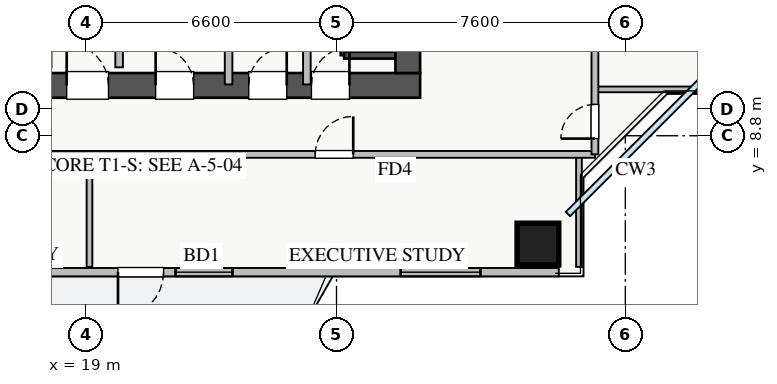
"""IFC4 building model, lengths in metres.
Left out: names, types, materials, properties, quantities, classifications, styles, units other than length and angle.
Written with IfcOpenShell. Run it as: python <this file> out.ifc"""

import sys

from ifc_helpers import new_model, si_unit, direction, frame, frame_2d, origin, origin_2d, place, context, subcontext, project, spatial, rectangle, extrude, source, transform, mapped, element, fill, save


model = new_model("IFC4")
c1 = context("Model", 3, precision=1e-05, world=origin(), true_north=direction((0.0, 1.0)))
c2 = subcontext(c1, "Body", "Model", "MODEL_VIEW")
j1 = project(units=[si_unit("LENGTHUNIT", "METRE"), si_unit("PLANEANGLEUNIT", "RADIAN")], contexts=[c1])
p1 = place(None, origin())
s1 = spatial("IfcSite", under=j1, at=p1, CompositionType="ELEMENT")
p2 = place(p1, origin())
s2 = spatial("IfcBuilding", under=s1, at=p2, CompositionType="ELEMENT")
p3 = place(p2, frame((0.0, 0.0, 100.25)))
s3 = spatial("IfcBuildingStorey", under=s2, at=p3, CompositionType="ELEMENT", Elevation=100.25)
p4 = place(p3, frame((25.8, 10.92, 0.0), z_axis=(0.0, 0.0, 1.0), x_axis=(0.0, 1.0, 0.0)))
e1 = element("IfcWall", 1, at=p4, inside=s3, PredefinedType="SHEAR", context=c2, shape_type="SweptSolid", body=[
    extrude(rectangle(XDim=1.06, YDim=0.18, at=frame_2d((0.53, 0.0))), origin(), (0.0, 0.0, 1.0), 3.07),
])
p5 = place(p3, frame((25.8, 10.92, 0.0), z_axis=(0.0, 0.0, 1.0), x_axis=(1.0, 0.0, 0.0)))
e2 = element("IfcWall", 2, at=p5, inside=s3, PredefinedType="SHEAR", context=c2, shape_type="SweptSolid", body=[
    extrude(rectangle(XDim=1.35, YDim=0.18, at=frame_2d((0.675, 0.0))), origin(), (0.0, 0.0, 1.0), 3.07),
])
p6 = place(p3, frame((10.2, 10.125, 0.0), z_axis=(0.0, 0.0, 1.0), x_axis=(1.0, 0.0, 0.0)))
e3 = element("IfcWall", 3, at=p6, inside=s3, PredefinedType="SHEAR", context=c2, shape_type="SweptSolid", body=[
    extrude(rectangle(XDim=17.6, YDim=0.65, at=frame_2d((8.8, 0.0))), origin(), (0.0, 0.0, 1.0), 3.25),
])
p7 = place(p6, frame((1.15, 0.0, 0.0)))
e4 = element("IfcOpeningElement", 4, at=p7, cuts=e3, PredefinedType="OPENING", context=c2, shape_type="SweptSolid", body=[
    extrude(rectangle(XDim=1.1, YDim=2.05, at=frame_2d((0.55, 1.025))), frame((0.0, 0.335, 0.0), z_axis=(0.0, -1.0, 0.0), x_axis=(1.0, 0.0, 0.0)), (0.0, 0.0, 1.0), 0.67),
])
p8 = place(p6, frame((8.3, 0.0, 0.0)))
e5 = element("IfcOpeningElement", 5, at=p8, cuts=e3, PredefinedType="OPENING", context=c2, shape_type="SweptSolid", body=[
    extrude(rectangle(XDim=1.1, YDim=2.05, at=frame_2d((0.55, 1.025))), frame((0.0, 0.335, 0.0), z_axis=(0.0, -1.0, 0.0), x_axis=(1.0, 0.0, 0.0)), (0.0, 0.0, 1.0), 0.67),
])
p9 = place(p6, frame((4.9, 0.0, 0.0)))
e6 = element("IfcOpeningElement", 6, at=p9, cuts=e3, PredefinedType="OPENING", context=c2, shape_type="SweptSolid", body=[
    extrude(rectangle(XDim=1.1, YDim=2.05, at=frame_2d((0.55, 1.025))), frame((0.0, 0.335, 0.0), z_axis=(0.0, -1.0, 0.0), x_axis=(1.0, 0.0, 0.0)), (0.0, 0.0, 1.0), 0.67),
])
p10 = place(p6, frame((14.74, 0.0, 0.0)))
e7 = element("IfcOpeningElement", 7, at=p10, cuts=e3, PredefinedType="OPENING", context=c2, shape_type="SweptSolid", body=[
    extrude(rectangle(XDim=1.0, YDim=2.05, at=frame_2d((0.5, 1.025))), frame((0.0, 0.335, 0.0), z_axis=(0.0, -1.0, 0.0), x_axis=(1.0, 0.0, 0.0)), (0.0, 0.0, 1.0), 0.67),
])
p11 = place(p6, frame((10.64, 0.0, 0.0)))
e8 = element("IfcOpeningElement", 8, at=p11, cuts=e3, PredefinedType="OPENING", context=c2, shape_type="SweptSolid", body=[
    extrude(rectangle(XDim=1.0, YDim=2.05, at=frame_2d((0.5, 1.025))), frame((0.0, 0.335, 0.0), z_axis=(0.0, -1.0, 0.0), x_axis=(1.0, 0.0, 0.0)), (0.0, 0.0, 1.0), 0.67),
])
p12 = place(p6, frame((13.09, 0.0, 0.0)))
e9 = element("IfcOpeningElement", 9, at=p12, cuts=e3, PredefinedType="OPENING", context=c2, shape_type="SweptSolid", body=[
    extrude(rectangle(XDim=1.0, YDim=2.05, at=frame_2d((0.5, 1.025))), frame((0.0, 0.335, 0.0), z_axis=(0.0, -1.0, 0.0), x_axis=(1.0, 0.0, 0.0)), (0.0, 0.0, 1.0), 0.67),
])
p13 = place(p3, frame((27.475, 10.45, 0.0), z_axis=(0.0, 0.0, 1.0), x_axis=(0.0, 1.0, 0.0)))
e10 = element("IfcWall", 10, at=p13, inside=s3, PredefinedType="SHEAR", context=c2, shape_type="SweptSolid", body=[
    extrude(rectangle(XDim=5.9, YDim=0.65, at=frame_2d((2.95, 0.0))), origin(), (0.0, 0.0, 1.0), 3.25),
])
p14 = place(p13, frame((2.1, 0.0, 0.0)))
e11 = element("IfcOpeningElement", 11, at=p14, cuts=e10, PredefinedType="OPENING", context=c2, shape_type="SweptSolid", body=[
    extrude(rectangle(XDim=1.3, YDim=2.05, at=frame_2d((0.65, 1.025))), frame((0.0, 0.335, 0.0), z_axis=(0.0, -1.0, 0.0), x_axis=(1.0, 0.0, 0.0)), (0.0, 0.0, 1.0), 0.67),
])
m1 = source(origin(), c2, "Body", "SweptSolid", [
    extrude(rectangle(XDim=1.1, YDim=1.1, at=origin_2d()), origin(), (0.0, 0.0, 1.0), 3.25),
])
p15 = place(p3, frame((30.9, 5.95, 0.0), z_axis=(0.0, 0.0, 1.0), x_axis=(1.0, 0.0, 0.0)))
e12 = element("IfcColumn", 12, at=p15, inside=s3, PredefinedType="COLUMN", context=c2, shape_type="MappedRepresentation", body=[
    mapped(m1, transform((0.0, 0.0, 0.0), x_axis=(1.0, 0.0, 0.0), y_axis=(0.0, 1.0, 0.0), z_axis=(0.0, 0.0, 1.0), scale=1.0)),
])
p16 = place(p3, frame((6.55, 5.21, 0.0), z_axis=(0.0, 0.0, 1.0), x_axis=(1.0, 0.0, 0.0)))
e13 = element("IfcWall", 13, at=p16, inside=s3, PredefinedType="STANDARD", context=c2, shape_type="SweptSolid", body=[
    extrude(rectangle(XDim=24.9, YDim=0.22, at=frame_2d((12.45, 0.0))), origin(), (0.0, 0.0, 1.0), 2.61),
])
p17 = place(p16, frame((13.3, 0.0, 0.0)))
e14 = element("IfcOpeningElement", 14, at=p17, cuts=e13, PredefinedType="OPENING", context=c2, shape_type="SweptSolid", body=[
    extrude(rectangle(XDim=1.2, YDim=2.1, at=frame_2d((0.6, 1.05))), frame((0.0, 0.12, 0.0), z_axis=(0.0, -1.0, 0.0), x_axis=(1.0, 0.0, 0.0)), (0.0, 0.0, 1.0), 0.24),
])
p18 = place(p16, frame((0.393, 0.0, 0.9)))
e15 = element("IfcOpeningElement", 15, at=p18, cuts=e13, PredefinedType="OPENING", context=c2, shape_type="SweptSolid", body=[
    extrude(rectangle(XDim=1.5, YDim=1.5, at=frame_2d((0.75, 0.75))), frame((0.0, 0.12, 0.0), z_axis=(0.0, -1.0, 0.0), x_axis=(1.0, 0.0, 0.0)), (0.0, 0.0, 1.0), 0.24),
])
p19 = place(p16, frame((8.438, 0.0, 0.9)))
e16 = element("IfcOpeningElement", 16, at=p19, cuts=e13, PredefinedType="OPENING", context=c2, shape_type="SweptSolid", body=[
    extrude(rectangle(XDim=1.8, YDim=1.45, at=frame_2d((0.9, 0.725))), frame((0.0, 0.12, 0.0), z_axis=(0.0, -1.0, 0.0), x_axis=(1.0, 0.0, 0.0)), (0.0, 0.0, 1.0), 0.24),
])
p20 = place(p16, frame((14.813, 0.0, 0.9)))
e17 = element("IfcOpeningElement", 17, at=p20, cuts=e13, PredefinedType="OPENING", context=c2, shape_type="SweptSolid", body=[
    extrude(rectangle(XDim=1.5, YDim=1.45, at=frame_2d((0.75, 0.725))), frame((0.0, 0.12, 0.0), z_axis=(0.0, -1.0, 0.0), x_axis=(1.0, 0.0, 0.0)), (0.0, 0.0, 1.0), 0.24),
])
p21 = place(p16, frame((20.738, 0.0, 0.9)))
e18 = element("IfcOpeningElement", 18, at=p21, cuts=e13, PredefinedType="OPENING", context=c2, shape_type="SweptSolid", body=[
    extrude(rectangle(XDim=2.1, YDim=1.48, at=frame_2d((1.05, 0.74))), frame((0.0, 0.12, 0.0), z_axis=(0.0, -1.0, 0.0), x_axis=(1.0, 0.0, 0.0)), (0.0, 0.0, 1.0), 0.24),
])
p22 = place(p16, frame((4.171, 0.0, 0.9)))
e19 = element("IfcOpeningElement", 19, at=p22, cuts=e13, PredefinedType="OPENING", context=c2, shape_type="SweptSolid", body=[
    extrude(rectangle(XDim=2.4, YDim=1.5, at=frame_2d((1.2, 0.75))), frame((0.0, 0.12, 0.0), z_axis=(0.0, -1.0, 0.0), x_axis=(1.0, 0.0, 0.0)), (0.0, 0.0, 1.0), 0.24),
])
p23 = place(p3, frame((19.88, 10.6, 0.0), z_axis=(0.0, 0.0, 1.0), x_axis=(0.0, 1.0, 0.0)))
e20 = element("IfcWall", 20, at=p23, inside=s3, PredefinedType="PARTITIONING", context=c2, shape_type="SweptSolid", body=[
    extrude(rectangle(XDim=2.21, YDim=0.2, at=frame_2d((1.105, 0.0))), origin(), (0.0, 0.0, 1.0), 3.07),
])
for number, where, z_axis, x_axis in (
    (21, (24.82, 10.15, 0.0), (0.0, 0.0, 1.0), (0.0, 1.0, 0.0)),
    (22, (22.76, 10.15, 0.0), (0.0, 0.0, 1.0), (0.0, 1.0, 0.0)),
):
    element("IfcWall", number, at=place(p3, frame(where, z_axis=z_axis, x_axis=x_axis)), inside=s3, PredefinedType="PARTITIONING", context=c2, shape_type="SweptSolid", body=[
        extrude(rectangle(XDim=2.65, YDim=0.2, at=frame_2d((1.325, 0.0))), origin(), (0.0, 0.0, 1.0), 3.07),
    ])
p24 = place(p3, frame((19.1, 5.35, 0.0), z_axis=(0.0, 0.0, 1.0), x_axis=(0.0, 1.0, 0.0)))
e23 = element("IfcWall", 23, at=p24, inside=s3, PredefinedType="PARTITIONING", context=c2, shape_type="SweptSolid", body=[
    extrude(rectangle(XDim=2.96, YDim=0.15, at=frame_2d((1.48, 0.0))), origin(), (0.0, 0.0, 1.0), 2.821),
])
p25 = place(p3, frame((31.98, 5.35, 0.0), z_axis=(0.0, 0.0, 1.0), x_axis=(0.0, 1.0, 0.0)))
e24 = element("IfcWall", 24, at=p25, inside=s3, PredefinedType="PARTITIONING", context=c2, shape_type="SweptSolid", body=[
    extrude(rectangle(XDim=2.96, YDim=0.15, at=frame_2d((1.48, 0.0))), origin(), (0.0, 0.0, 1.0), 3.07),
])
p26 = place(p3, frame((8.82, 8.31, 0.0), z_axis=(0.0, 0.0, 1.0), x_axis=(1.0, 0.0, 0.0)))
e25 = element("IfcWall", 25, at=p26, inside=s3, PredefinedType="PARTITIONING", context=c2, shape_type="SweptSolid", body=[
    extrude(rectangle(XDim=23.58, YDim=0.18, at=frame_2d((11.79, 0.0))), origin(), (0.0, 0.0, 1.0), 3.07),
])
p27 = place(p26, frame((4.64, 0.0, 0.0)))
e26 = element("IfcOpeningElement", 26, at=p27, cuts=e25, PredefinedType="OPENING", context=c2, shape_type="SweptSolid", body=[
    extrude(rectangle(XDim=1.0, YDim=2.05, at=frame_2d((0.5, 1.025))), frame((0.0, 0.1, 0.0), z_axis=(0.0, -1.0, 0.0), x_axis=(1.0, 0.0, 0.0)), (0.0, 0.0, 1.0), 0.2),
])
p28 = place(p26, frame((16.22, 0.0, 0.0)))
e27 = element("IfcOpeningElement", 27, at=p28, cuts=e25, PredefinedType="OPENING", context=c2, shape_type="SweptSolid", body=[
    extrude(rectangle(XDim=1.0, YDim=2.05, at=frame_2d((0.5, 1.025))), frame((0.0, 0.1, 0.0), z_axis=(0.0, -1.0, 0.0), x_axis=(1.0, 0.0, 0.0)), (0.0, 0.0, 1.0), 0.2),
])
p29 = place(p3, frame((32.4, 10.02, 0.0), z_axis=(0.0, 0.0, 1.0), x_axis=(1.0, 0.0, 0.0)))
e28 = element("IfcWall", 28, at=p29, inside=s3, PredefinedType="PARTITIONING", context=c2, shape_type="SweptSolid", body=[
    extrude(rectangle(XDim=4.25, YDim=0.15, at=frame_2d((2.125, 0.0))), origin(), (0.0, 0.0, 1.0), 3.07),
])
p30 = place(p3, frame((32.4, 8.31, 0.0), z_axis=(0.0, 0.0, 1.0), x_axis=(0.0, 1.0, 0.0)))
e29 = element("IfcWall", 29, at=p30, inside=s3, PredefinedType="PARTITIONING", context=c2, shape_type="SweptSolid", body=[
    extrude(rectangle(XDim=29.13, YDim=0.18, at=frame_2d((14.565, 0.0))), origin(), (0.0, 0.0, 1.0), 3.07),
])
p31 = place(p30, frame((27.94, 0.0, 0.0)))
e30 = element("IfcOpeningElement", 30, at=p31, cuts=e29, PredefinedType="OPENING", context=c2, shape_type="SweptSolid", body=[
    extrude(rectangle(XDim=0.9, YDim=2.05, at=frame_2d((0.45, 1.025))), frame((0.0, 0.1, 0.0), z_axis=(0.0, -1.0, 0.0), x_axis=(1.0, 0.0, 0.0)), (0.0, 0.0, 1.0), 0.2),
])
p32 = place(p30, frame((0.415, 0.0, 0.0)))
e31 = element("IfcOpeningElement", 31, at=p32, cuts=e29, PredefinedType="OPENING", context=c2, shape_type="SweptSolid", body=[
    extrude(rectangle(XDim=0.9, YDim=2.05, at=frame_2d((0.45, 1.025))), frame((0.0, 0.1, 0.0), z_axis=(0.0, -1.0, 0.0), x_axis=(1.0, 0.0, 0.0)), (0.0, 0.0, 1.0), 0.2),
])
p33 = place(p30, frame((5.88, 0.0, 0.0)))
e32 = element("IfcOpeningElement", 32, at=p33, cuts=e29, PredefinedType="OPENING", context=c2, shape_type="SweptSolid", body=[
    extrude(rectangle(XDim=1.0, YDim=2.05, at=frame_2d((0.5, 1.025))), frame((0.0, 0.1, 0.0), z_axis=(0.0, -1.0, 0.0), x_axis=(1.0, 0.0, 0.0)), (0.0, 0.0, 1.0), 0.2),
])
p34 = place(p30, frame((12.23, 0.0, 0.0)))
e33 = element("IfcOpeningElement", 33, at=p34, cuts=e29, PredefinedType="OPENING", context=c2, shape_type="SweptSolid", body=[
    extrude(rectangle(XDim=1.0, YDim=2.05, at=frame_2d((0.5, 1.025))), frame((0.0, 0.1, 0.0), z_axis=(0.0, -1.0, 0.0), x_axis=(1.0, 0.0, 0.0)), (0.0, 0.0, 1.0), 0.2),
])
p35 = place(p30, frame((20.835, 0.0, 0.0)))
e34 = element("IfcOpeningElement", 34, at=p35, cuts=e29, PredefinedType="OPENING", context=c2, shape_type="SweptSolid", body=[
    extrude(rectangle(XDim=1.0, YDim=2.05, at=frame_2d((0.5, 1.025))), frame((0.0, 0.1, 0.0), z_axis=(0.0, -1.0, 0.0), x_axis=(1.0, 0.0, 0.0)), (0.0, 0.0, 1.0), 0.2),
])
m2 = source(origin(), c2, "Body", "SweptSolid", [
    extrude(rectangle(XDim=1.2, YDim=2.1, at=frame_2d((0.6, 1.05))), frame((0.0, 0.025, 0.0), z_axis=(0.0, -1.0, 0.0), x_axis=(1.0, 0.0, 0.0)), (0.0, 0.0, 1.0), 0.05),
])
p36 = place(p17, frame((1.2, 0.0, 0.0), z_axis=(0.0, 0.0, 1.0), x_axis=(-1.0, 0.0, 0.0)))
e35 = element("IfcDoor", 35, at=p36, inside=s3, OperationType="SINGLE_SWING_LEFT", PredefinedType="DOOR", context=c2, shape_type="MappedRepresentation", body=[
    mapped(m2, transform((0.0, 0.0, 0.0), x_axis=(1.0, 0.0, 0.0), y_axis=(0.0, 1.0, 0.0), z_axis=(0.0, 0.0, 1.0), scale=1.0)),
])
fill(e14, e35)
m3 = source(origin(), c2, "Body", "SweptSolid", [
    extrude(rectangle(XDim=1.5, YDim=1.45, at=frame_2d((0.75, 0.725))), frame((0.0, 0.03, 0.0), z_axis=(0.0, -1.0, 0.0), x_axis=(1.0, 0.0, 0.0)), (0.0, 0.0, 1.0), 0.06),
])
p37 = place(p20, origin())
e36 = element("IfcWindow", 36, at=p37, inside=s3, PartitioningType="DOUBLE_PANEL_VERTICAL", PredefinedType="WINDOW", context=c2, shape_type="MappedRepresentation", body=[
    mapped(m3, transform((0.0, 0.0, 0.0), x_axis=(1.0, 0.0, 0.0), y_axis=(0.0, 1.0, 0.0), z_axis=(0.0, 0.0, 1.0), scale=1.0)),
])
fill(e17, e36)
m4 = source(origin(), c2, "Body", "SweptSolid", [
    extrude(rectangle(XDim=2.1, YDim=1.48, at=frame_2d((1.05, 0.74))), frame((0.0, 0.03, 0.0), z_axis=(0.0, -1.0, 0.0), x_axis=(1.0, 0.0, 0.0)), (0.0, 0.0, 1.0), 0.06),
])
p38 = place(p21, origin())
e37 = element("IfcWindow", 37, at=p38, inside=s3, PartitioningType="TRIPLE_PANEL_VERTICAL", PredefinedType="WINDOW", context=c2, shape_type="MappedRepresentation", body=[
    mapped(m4, transform((0.0, 0.0, 0.0), x_axis=(1.0, 0.0, 0.0), y_axis=(0.0, 1.0, 0.0), z_axis=(0.0, 0.0, 1.0), scale=1.0)),
])
fill(e18, e37)
m5 = source(origin(), c2, "Body", "SweptSolid", [
    extrude(rectangle(XDim=1.1, YDim=2.05, at=frame_2d((0.55, 1.025))), frame((0.0, 0.025, 0.0), z_axis=(0.0, -1.0, 0.0), x_axis=(1.0, 0.0, 0.0)), (0.0, 0.0, 1.0), 0.05),
])
p39 = place(p8, origin())
e38 = element("IfcDoor", 38, at=p39, inside=s3, OperationType="SINGLE_SWING_LEFT", PredefinedType="DOOR", context=c2, shape_type="MappedRepresentation", body=[
    mapped(m5, transform((0.0, 0.0, 0.0), x_axis=(1.0, 0.0, 0.0), y_axis=(0.0, 1.0, 0.0), z_axis=(0.0, 0.0, 1.0), scale=1.0)),
])
fill(e5, e38)
m6 = source(origin(), c2, "Body", "SweptSolid", [
    extrude(rectangle(XDim=1.0, YDim=2.05, at=frame_2d((0.5, 1.025))), frame((0.0, 0.025, 0.0), z_axis=(0.0, -1.0, 0.0), x_axis=(1.0, 0.0, 0.0)), (0.0, 0.0, 1.0), 0.05),
])
p40 = place(p10, origin())
e39 = element("IfcDoor", 39, at=p40, inside=s3, OperationType="SINGLE_SWING_RIGHT", PredefinedType="DOOR", context=c2, shape_type="MappedRepresentation", body=[
    mapped(m6, transform((0.0, 0.0, 0.0), x_axis=(1.0, 0.0, 0.0), y_axis=(0.0, 1.0, 0.0), z_axis=(0.0, 0.0, 1.0), scale=1.0)),
])
fill(e7, e39)
p41 = place(p11, origin())
e40 = element("IfcDoor", 40, at=p41, inside=s3, OperationType="SINGLE_SWING_LEFT", PredefinedType="DOOR", context=c2, shape_type="MappedRepresentation", body=[
    mapped(m6, transform((0.0, 0.0, 0.0), x_axis=(1.0, 0.0, 0.0), y_axis=(0.0, 1.0, 0.0), z_axis=(0.0, 0.0, 1.0), scale=1.0)),
])
fill(e8, e40)
p42 = place(p12, origin())
e41 = element("IfcDoor", 41, at=p42, inside=s3, OperationType="SINGLE_SWING_RIGHT", PredefinedType="DOOR", context=c2, shape_type="MappedRepresentation", body=[
    mapped(m6, transform((0.0, 0.0, 0.0), x_axis=(1.0, 0.0, 0.0), y_axis=(0.0, 1.0, 0.0), z_axis=(0.0, 0.0, 1.0), scale=1.0)),
])
fill(e9, e41)
p43 = place(p28, origin())
e42 = element("IfcDoor", 42, at=p43, inside=s3, OperationType="SINGLE_SWING_RIGHT", PredefinedType="DOOR", context=c2, shape_type="MappedRepresentation", body=[
    mapped(m6, transform((0.0, 0.0, 0.0), x_axis=(1.0, 0.0, 0.0), y_axis=(0.0, 1.0, 0.0), z_axis=(0.0, 0.0, 1.0), scale=1.0)),
])
fill(e27, e42)
m7 = source(origin(), c2, "Body", "SweptSolid", [
    extrude(rectangle(XDim=0.9, YDim=2.05, at=frame_2d((0.45, 1.025))), frame((0.0, 0.025, 0.0), z_axis=(0.0, -1.0, 0.0), x_axis=(1.0, 0.0, 0.0)), (0.0, 0.0, 1.0), 0.05),
])
p44 = place(p32, origin())
e43 = element("IfcDoor", 43, at=p44, inside=s3, OperationType="SINGLE_SWING_LEFT", PredefinedType="DOOR", context=c2, shape_type="MappedRepresentation", body=[
    mapped(m7, transform((0.0, 0.0, 0.0), x_axis=(1.0, 0.0, 0.0), y_axis=(0.0, 1.0, 0.0), z_axis=(0.0, 0.0, 1.0), scale=1.0)),
])
fill(e31, e43)
save(model, sys.argv[1])
